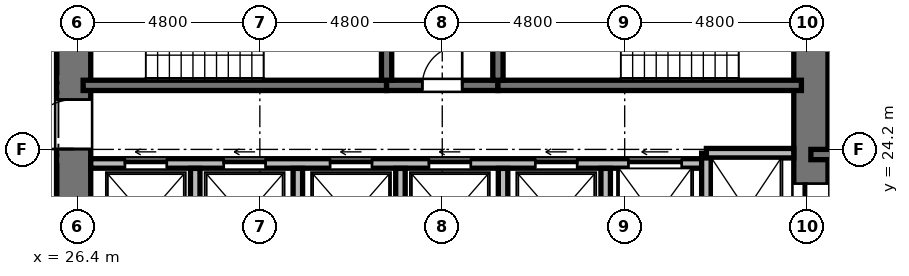
"""IFC4 building model, lengths in metres.
Left out: names, types, materials, properties, quantities, classifications, styles, units other than length and angle.
Written with IfcOpenShell. Run it as: python <this file> out.ifc"""

import sys

from ifc_helpers import new_model, si_unit, direction, frame, frame_2d, origin, place, context, subcontext, project, spatial, rectangle, extrude, element, fill, save


model = new_model("IFC4")
c1 = context("Model", 3, precision=1e-05, world=origin(), true_north=direction((0.0, 1.0)))
c2 = subcontext(c1, "Body", "Model", "MODEL_VIEW")
j1 = project(units=[si_unit("LENGTHUNIT", "METRE"), si_unit("PLANEANGLEUNIT", "RADIAN")], contexts=[c1])
p1 = place(None, origin())
s1 = spatial("IfcSite", under=j1, at=p1, CompositionType="ELEMENT")
p2 = place(p1, origin())
s2 = spatial("IfcBuilding", under=s1, at=p2, CompositionType="ELEMENT")
p3 = place(p2, frame((0.0, 0.0, 36.144)))
s3 = spatial("IfcBuildingStorey", under=s2, at=p3, CompositionType="ELEMENT", Elevation=36.144)
p4 = place(p3, frame((26.3, 20.95, 0.0), z_axis=(0.0, 0.0, 1.0), x_axis=(0.0, 1.0, 0.0)))
e1 = element("IfcWall", 1, at=p4, inside=s3, PredefinedType="SHEAR", context=c2, shape_type="SweptSolid", body=[
    extrude(rectangle(XDim=14.1, YDim=0.9, at=frame_2d((7.05, 0.0))), origin(), (0.0, 0.0, 1.0), 3.648),
])
p5 = place(p4, frame((6.5, 0.0, 0.0)))
e2 = element("IfcOpeningElement", 2, at=p5, cuts=e1, PredefinedType="OPENING", context=c2, shape_type="SweptSolid", body=[
    extrude(rectangle(XDim=1.2, YDim=2.15, at=frame_2d((0.6, 1.075))), frame((0.0, 0.46, 0.0), z_axis=(0.0, -1.0, 0.0), x_axis=(1.0, 0.0, 0.0)), (0.0, 0.0, 1.0), 0.92),
])
p6 = place(p4, frame((9.6, 0.0, 0.0)))
e3 = element("IfcOpeningElement", 3, at=p6, cuts=e1, PredefinedType="OPENING", context=c2, shape_type="SweptSolid", body=[
    extrude(rectangle(XDim=1.3, YDim=2.2, at=frame_2d((0.65, 1.1))), frame((0.0, 0.46, 0.0), z_axis=(0.0, -1.0, 0.0), x_axis=(1.0, 0.0, 0.0)), (0.0, 0.0, 1.0), 0.92),
])
p7 = place(p4, frame((3.26, 0.0, 0.0)))
e4 = element("IfcOpeningElement", 4, at=p7, cuts=e1, PredefinedType="OPENING", context=c2, shape_type="SweptSolid", body=[
    extrude(rectangle(XDim=1.3, YDim=2.2, at=frame_2d((0.65, 1.1))), frame((0.0, 0.46, 0.0), z_axis=(0.0, -1.0, 0.0), x_axis=(1.0, 0.0, 0.0)), (0.0, 0.0, 1.0), 0.92),
])
p8 = place(p3, frame((45.7, 20.95, 0.0), z_axis=(0.0, 0.0, 1.0), x_axis=(0.0, 1.0, 0.0)))
e5 = element("IfcWall", 5, at=p8, inside=s3, PredefinedType="SHEAR", context=c2, shape_type="SweptSolid", body=[
    extrude(rectangle(XDim=14.1, YDim=0.9, at=frame_2d((7.05, 0.0))), origin(), (0.0, 0.0, 1.0), 3.648),
])
p9 = place(p8, frame((11.75, 0.0, 0.0)))
e6 = element("IfcOpeningElement", 6, at=p9, cuts=e5, PredefinedType="OPENING", context=c2, shape_type="SweptSolid", body=[
    extrude(rectangle(XDim=1.4, YDim=2.3, at=frame_2d((0.7, 1.15))), frame((0.0, 0.46, 0.0), z_axis=(0.0, -1.0, 0.0), x_axis=(1.0, 0.0, 0.0)), (0.0, 0.0, 1.0), 0.92),
])
p10 = place(p8, frame((0.95, 0.0, 0.0)))
e7 = element("IfcOpeningElement", 7, at=p10, cuts=e5, PredefinedType="OPENING", context=c2, shape_type="SweptSolid", body=[
    extrude(rectangle(XDim=1.4, YDim=2.3, at=frame_2d((0.7, 1.15))), frame((0.0, 0.46, 0.0), z_axis=(0.0, -1.0, 0.0), x_axis=(1.0, 0.0, 0.0)), (0.0, 0.0, 1.0), 0.92),
])
p11 = place(p3, frame((26.55, 25.885, 0.0), z_axis=(0.0, 0.0, 1.0), x_axis=(1.0, 0.0, 0.0)))
e8 = element("IfcWall", 8, at=p11, inside=s3, PredefinedType="SHEAR", context=c2, shape_type="SweptSolid", body=[
    extrude(rectangle(XDim=7.985, YDim=0.27, at=frame_2d((3.992, 0.0))), origin(), (0.0, 0.0, 1.0), 3.648),
])
p12 = place(p3, frame((34.535, 25.885, 0.0), z_axis=(0.0, 0.0, 1.0), x_axis=(1.0, 0.0, 0.0)))
e9 = element("IfcWall", 9, at=p12, inside=s3, PredefinedType="SHEAR", context=c2, shape_type="SweptSolid", body=[
    extrude(rectangle(XDim=2.93, YDim=0.27, at=frame_2d((1.465, 0.0))), origin(), (0.0, 0.0, 1.0), 3.648),
])
p13 = place(p12, frame((0.94, 0.0, 0.0)))
e10 = element("IfcOpeningElement", 10, at=p13, cuts=e9, PredefinedType="OPENING", context=c2, shape_type="SweptSolid", body=[
    extrude(rectangle(XDim=1.05, YDim=2.15, at=frame_2d((0.525, 1.075))), frame((0.0, 0.145, 0.0), z_axis=(0.0, -1.0, 0.0), x_axis=(1.0, 0.0, 0.0)), (0.0, 0.0, 1.0), 0.29),
])
p14 = place(p3, frame((37.465, 25.885, 0.0), z_axis=(0.0, 0.0, 1.0), x_axis=(1.0, 0.0, 0.0)))
e11 = element("IfcWall", 11, at=p14, inside=s3, PredefinedType="SHEAR", context=c2, shape_type="SweptSolid", body=[
    extrude(rectangle(XDim=7.985, YDim=0.27, at=frame_2d((3.992, 0.0))), origin(), (0.0, 0.0, 1.0), 3.648),
])
for number, where, z_axis, x_axis in (
    (12, (34.535, 26.02, 0.0), (0.0, 0.0, 1.0), (0.0, 1.0, 0.0)),
    (13, (37.465, 26.02, 0.0), (0.0, 0.0, 1.0), (0.0, 1.0, 0.0)),
):
    element("IfcWall", number, at=place(p3, frame(where, z_axis=z_axis, x_axis=x_axis)), inside=s3, PredefinedType="SHEAR", context=c2, shape_type="SweptSolid", body=[
        extrude(rectangle(XDim=4.08, YDim=0.27, at=frame_2d((2.04, 0.0))), origin(), (0.0, 0.0, 1.0), 3.648),
    ])
p15 = place(p3, frame((26.75, 23.83, 0.0), z_axis=(0.0, 0.0, 1.0), x_axis=(1.0, 0.0, 0.0)))
e14 = element("IfcWall", 14, at=p15, inside=s3, PredefinedType="SOLIDWALL", context=c2, shape_type="SweptSolid", body=[
    extrude(rectangle(XDim=16.2, YDim=0.25, at=frame_2d((8.1, 0.0))), origin(), (0.0, 0.0, 1.0), 3.428),
])
p16 = place(p15, frame((0.9, 0.0, 0.0)))
e15 = element("IfcOpeningElement", 15, at=p16, cuts=e14, PredefinedType="OPENING", context=c2, shape_type="SweptSolid", body=[
    extrude(rectangle(XDim=1.1, YDim=2.2, at=frame_2d((0.55, 1.1))), frame((0.0, 0.135, 0.0), z_axis=(0.0, -1.0, 0.0), x_axis=(1.0, 0.0, 0.0)), (0.0, 0.0, 1.0), 0.27),
])
p17 = place(p15, frame((3.5, 0.0, 0.0)))
e16 = element("IfcOpeningElement", 16, at=p17, cuts=e14, PredefinedType="OPENING", context=c2, shape_type="SweptSolid", body=[
    extrude(rectangle(XDim=1.1, YDim=2.2, at=frame_2d((0.55, 1.1))), frame((0.0, 0.135, 0.0), z_axis=(0.0, -1.0, 0.0), x_axis=(1.0, 0.0, 0.0)), (0.0, 0.0, 1.0), 0.27),
])
p18 = place(p15, frame((6.3, 0.0, 0.0)))
e17 = element("IfcOpeningElement", 17, at=p18, cuts=e14, PredefinedType="OPENING", context=c2, shape_type="SweptSolid", body=[
    extrude(rectangle(XDim=1.1, YDim=2.2, at=frame_2d((0.55, 1.1))), frame((0.0, 0.135, 0.0), z_axis=(0.0, -1.0, 0.0), x_axis=(1.0, 0.0, 0.0)), (0.0, 0.0, 1.0), 0.27),
])
p19 = place(p15, frame((8.9, 0.0, 0.0)))
e18 = element("IfcOpeningElement", 18, at=p19, cuts=e14, PredefinedType="OPENING", context=c2, shape_type="SweptSolid", body=[
    extrude(rectangle(XDim=1.1, YDim=2.2, at=frame_2d((0.55, 1.1))), frame((0.0, 0.135, 0.0), z_axis=(0.0, -1.0, 0.0), x_axis=(1.0, 0.0, 0.0)), (0.0, 0.0, 1.0), 0.27),
])
p20 = place(p15, frame((11.7, 0.0, 0.0)))
e19 = element("IfcOpeningElement", 19, at=p20, cuts=e14, PredefinedType="OPENING", context=c2, shape_type="SweptSolid", body=[
    extrude(rectangle(XDim=1.1, YDim=2.2, at=frame_2d((0.55, 1.1))), frame((0.0, 0.135, 0.0), z_axis=(0.0, -1.0, 0.0), x_axis=(1.0, 0.0, 0.0)), (0.0, 0.0, 1.0), 0.27),
])
p21 = place(p15, frame((14.15, 0.0, 0.0)))
e20 = element("IfcOpeningElement", 20, at=p21, cuts=e14, PredefinedType="OPENING", context=c2, shape_type="SweptSolid", body=[
    extrude(rectangle(XDim=1.4, YDim=2.3, at=frame_2d((0.7, 1.15))), frame((0.0, 0.135, 0.0), z_axis=(0.0, -1.0, 0.0), x_axis=(1.0, 0.0, 0.0)), (0.0, 0.0, 1.0), 0.27),
])
p22 = place(p3, frame((42.95, 20.9, 0.0), z_axis=(0.0, 0.0, 1.0), x_axis=(0.0, 1.0, 0.0)))
e21 = element("IfcWall", 21, at=p22, inside=s3, PredefinedType="SOLIDWALL", context=c2, shape_type="SweptSolid", body=[
    extrude(rectangle(XDim=3.2, YDim=0.25, at=frame_2d((1.6, 0.0))), origin(), (0.0, 0.0, 1.0), 3.428),
])
p23 = place(p3, frame((42.95, 24.1, 0.0), z_axis=(0.0, 0.0, 1.0), x_axis=(1.0, 0.0, 0.0)))
e22 = element("IfcWall", 22, at=p23, inside=s3, PredefinedType="SOLIDWALL", context=c2, shape_type="SweptSolid", body=[
    extrude(rectangle(XDim=2.3, YDim=0.25, at=frame_2d((1.15, 0.0))), origin(), (0.0, 0.0, 1.0), 3.428),
])
for number, where, z_axis, x_axis in (
    (23, (29.5, 20.9, 0.0), (0.0, 0.0, 1.0), (0.0, 1.0, 0.0)),
    (24, (32.2, 20.9, 0.0), (0.0, 0.0, 1.0), (0.0, 1.0, 0.0)),
    (25, (34.9, 20.9, 0.0), (0.0, 0.0, 1.0), (0.0, 1.0, 0.0)),
    (26, (37.6, 20.9, 0.0), (0.0, 0.0, 1.0), (0.0, 1.0, 0.0)),
    (27, (40.3, 20.9, 0.0), (0.0, 0.0, 1.0), (0.0, 1.0, 0.0)),
):
    element("IfcWall", number, at=place(p3, frame(where, z_axis=z_axis, x_axis=x_axis)), inside=s3, PredefinedType="SOLIDWALL", context=c2, shape_type="SweptSolid", body=[
        extrude(rectangle(XDim=2.8, YDim=0.25, at=frame_2d((1.4, 0.0))), origin(), (0.0, 0.0, 1.0), 3.428),
    ])
p24 = place(p3, frame((45.7, 24.065, 0.0), z_axis=(0.0, 0.0, 1.0), x_axis=(1.0, 0.0, 0.0)))
e28 = element("IfcWall", 28, at=p24, inside=s3, PredefinedType="SHEAR", context=c2, shape_type="SweptSolid", body=[
    extrude(rectangle(XDim=4.715, YDim=0.27, at=frame_2d((2.357, 0.0))), origin(), (0.0, 0.0, 1.0), 3.648),
])
p25 = place(p13, origin())
e29 = element("IfcDoor", 29, at=p25, inside=s3, OperationType="SINGLE_SWING_RIGHT", PredefinedType="DOOR", context=c2, shape_type="SweptSolid", body=[
    extrude(rectangle(XDim=1.05, YDim=2.15, at=frame_2d((0.525, 1.075))), frame((0.0, 0.025, 0.0), z_axis=(0.0, -1.0, 0.0), x_axis=(1.0, 0.0, 0.0)), (0.0, 0.0, 1.0), 0.05),
])
fill(e10, e29)
p26 = place(p7, origin())
e30 = element("IfcDoor", 30, at=p26, inside=s3, OperationType="SINGLE_SWING_LEFT", PredefinedType="DOOR", context=c2, shape_type="SweptSolid", body=[
    extrude(rectangle(XDim=1.3, YDim=2.2, at=frame_2d((0.65, 1.1))), frame((0.0, 0.025, 0.0), z_axis=(0.0, -1.0, 0.0), x_axis=(1.0, 0.0, 0.0)), (0.0, 0.0, 1.0), 0.05),
])
fill(e4, e30)
p27 = place(p16, origin())
e31 = element("IfcDoor", 31, at=p27, inside=s3, OperationType="SLIDING_TO_LEFT", PredefinedType="DOOR", context=c2, shape_type="SweptSolid", body=[
    extrude(rectangle(XDim=1.1, YDim=2.2, at=frame_2d((0.55, 1.1))), frame((0.0, 0.025, 0.0), z_axis=(0.0, -1.0, 0.0), x_axis=(1.0, 0.0, 0.0)), (0.0, 0.0, 1.0), 0.05),
])
fill(e15, e31)
p28 = place(p17, origin())
e32 = element("IfcDoor", 32, at=p28, inside=s3, OperationType="SLIDING_TO_LEFT", PredefinedType="DOOR", context=c2, shape_type="SweptSolid", body=[
    extrude(rectangle(XDim=1.1, YDim=2.2, at=frame_2d((0.55, 1.1))), frame((0.0, 0.025, 0.0), z_axis=(0.0, -1.0, 0.0), x_axis=(1.0, 0.0, 0.0)), (0.0, 0.0, 1.0), 0.05),
])
fill(e16, e32)
p29 = place(p18, origin())
e33 = element("IfcDoor", 33, at=p29, inside=s3, OperationType="SLIDING_TO_LEFT", PredefinedType="DOOR", context=c2, shape_type="SweptSolid", body=[
    extrude(rectangle(XDim=1.1, YDim=2.2, at=frame_2d((0.55, 1.1))), frame((0.0, 0.025, 0.0), z_axis=(0.0, -1.0, 0.0), x_axis=(1.0, 0.0, 0.0)), (0.0, 0.0, 1.0), 0.05),
])
fill(e17, e33)
p30 = place(p19, origin())
e34 = element("IfcDoor", 34, at=p30, inside=s3, OperationType="SLIDING_TO_LEFT", PredefinedType="DOOR", context=c2, shape_type="SweptSolid", body=[
    extrude(rectangle(XDim=1.1, YDim=2.2, at=frame_2d((0.55, 1.1))), frame((0.0, 0.025, 0.0), z_axis=(0.0, -1.0, 0.0), x_axis=(1.0, 0.0, 0.0)), (0.0, 0.0, 1.0), 0.05),
])
fill(e18, e34)
p31 = place(p20, origin())
e35 = element("IfcDoor", 35, at=p31, inside=s3, OperationType="SLIDING_TO_LEFT", PredefinedType="DOOR", context=c2, shape_type="SweptSolid", body=[
    extrude(rectangle(XDim=1.1, YDim=2.2, at=frame_2d((0.55, 1.1))), frame((0.0, 0.025, 0.0), z_axis=(0.0, -1.0, 0.0), x_axis=(1.0, 0.0, 0.0)), (0.0, 0.0, 1.0), 0.05),
])
fill(e19, e35)
p32 = place(p10, origin())
e36 = element("IfcDoor", 36, at=p32, inside=s3, OperationType="SLIDING_TO_LEFT", PredefinedType="DOOR", context=c2, shape_type="SweptSolid", body=[
    extrude(rectangle(XDim=1.4, YDim=2.3, at=frame_2d((0.7, 1.15))), frame((0.0, 0.025, 0.0), z_axis=(0.0, -1.0, 0.0), x_axis=(1.0, 0.0, 0.0)), (0.0, 0.0, 1.0), 0.05),
])
fill(e7, e36)
p33 = place(p21, origin())
e37 = element("IfcDoor", 37, at=p33, inside=s3, OperationType="SLIDING_TO_LEFT", PredefinedType="DOOR", context=c2, shape_type="SweptSolid", body=[
    extrude(rectangle(XDim=1.4, YDim=2.3, at=frame_2d((0.7, 1.15))), frame((0.0, 0.025, 0.0), z_axis=(0.0, -1.0, 0.0), x_axis=(1.0, 0.0, 0.0)), (0.0, 0.0, 1.0), 0.05),
])
fill(e20, e37)
save(model, sys.argv[1])
